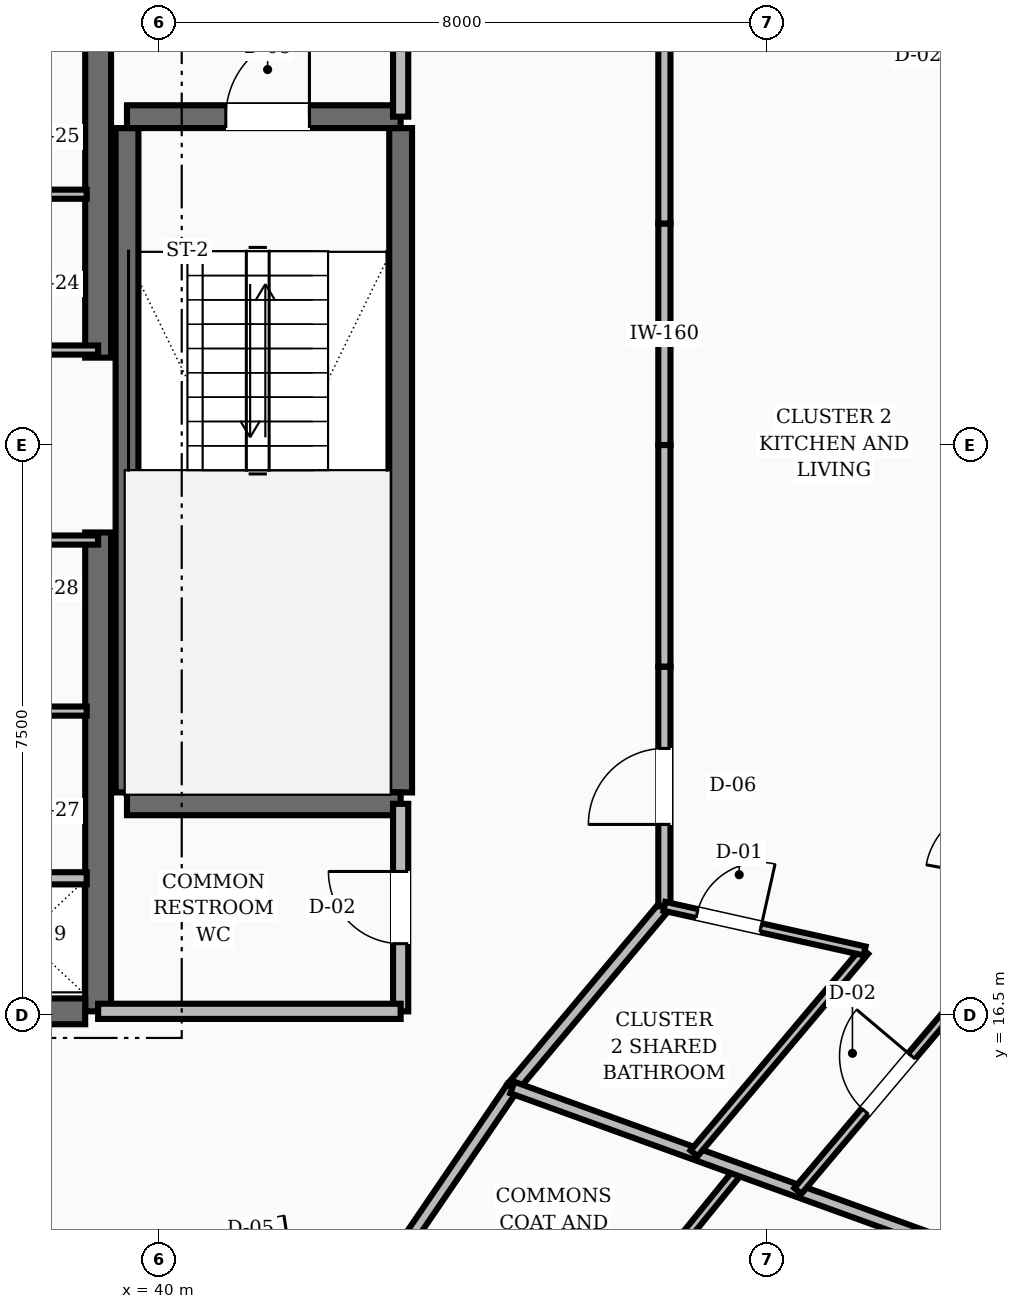
"""IFC4 building model, lengths in metres.
Left out: names, types, materials, properties, quantities, classifications, styles, units other than length and angle.
Written with IfcOpenShell. Run it as: python <this file> out.ifc"""

import sys

from ifc_helpers import new_model, si_unit, direction, frame, frame_2d, origin, place, context, subcontext, project, spatial, rectangle, extrude, element, fill, save


model = new_model("IFC4")
c1 = context("Model", 3, precision=1e-05, world=origin(), true_north=direction((0.0, 1.0)))
c2 = subcontext(c1, "Body", "Model", "MODEL_VIEW")
j1 = project(units=[si_unit("LENGTHUNIT", "METRE"), si_unit("PLANEANGLEUNIT", "RADIAN")], contexts=[c1])
p1 = place(None, origin())
s1 = spatial("IfcSite", under=j1, at=p1, CompositionType="ELEMENT")
p2 = place(p1, origin())
s2 = spatial("IfcBuilding", under=s1, at=p2, CompositionType="ELEMENT")
p3 = place(p2, frame((0.0, 0.0, 174.8)))
s3 = spatial("IfcBuildingStorey", under=s2, at=p3, CompositionType="ELEMENT", Elevation=174.8)
for number, where, z_axis, x_axis in (
    (1, (39.2, 16.55, 0.0), (0.0, 0.0, 1.0), (0.0, 1.0, 0.0)),
    (2, (39.2, 25.15, 0.0), (0.0, 0.0, 1.0), (0.0, 1.0, 0.0)),
):
    element("IfcWall", number, at=place(p3, frame(where, z_axis=z_axis, x_axis=x_axis)), inside=s3, PredefinedType="SHEAR", context=c2, shape_type="SweptSolid", body=[
        extrude(rectangle(XDim=6.3, YDim=0.34, at=frame_2d((3.15, 0.0))), origin(), (0.0, 0.0, 1.0), 3.6),
    ])
p4 = place(p3, frame((35.8, 16.55, 0.0), z_axis=(0.0, 0.0, 1.0), x_axis=(1.0, 0.0, 0.0)))
e3 = element("IfcWall", 3, at=p4, inside=s3, PredefinedType="SHEAR", context=c2, shape_type="SweptSolid", body=[
    extrude(rectangle(XDim=3.23, YDim=0.34, at=frame_2d((1.615, 0.0))), origin(), (0.0, 0.0, 1.0), 3.6),
])
p5 = place(p4, frame((0.3, 0.0, 0.0)))
e4 = element("IfcOpeningElement", 4, at=p5, cuts=e3, PredefinedType="OPENING", context=c2, shape_type="SweptSolid", body=[
    extrude(rectangle(XDim=1.1, YDim=2.1, at=frame_2d((0.55, 1.05))), frame((0.0, 0.18, 0.0), z_axis=(0.0, -1.0, 0.0), x_axis=(1.0, 0.0, 0.0)), (0.0, 0.0, 1.0), 0.36),
])
for number, where, z_axis, x_axis in (
    (5, (43.18, 19.43, 0.0), (0.0, 0.0, 1.0), (0.0, 1.0, 0.0)),
    (6, (39.58, 19.43, 0.0), (0.0, 0.0, 1.0), (0.0, 1.0, 0.0)),
):
    element("IfcWall", number, at=place(p3, frame(where, z_axis=z_axis, x_axis=x_axis)), inside=s3, PredefinedType="SHEAR", context=c2, shape_type="SweptSolid", body=[
        extrude(rectangle(XDim=8.74, YDim=0.3, at=frame_2d((4.37, 0.0))), origin(), (0.0, 0.0, 1.0), 3.6),
    ])
p6 = place(p3, frame((39.58, 19.28, 0.0), z_axis=(0.0, 0.0, 1.0), x_axis=(1.0, 0.0, 0.0)))
e7 = element("IfcWall", 7, at=p6, inside=s3, PredefinedType="SHEAR", context=c2, shape_type="SweptSolid", body=[
    extrude(rectangle(XDim=3.6, YDim=0.3, at=frame_2d((1.8, 0.0))), origin(), (0.0, 0.0, 1.0), 3.6),
])
p7 = place(p3, frame((39.58, 28.32, 0.0), z_axis=(0.0, 0.0, 1.0), x_axis=(1.0, 0.0, 0.0)))
e8 = element("IfcWall", 8, at=p7, inside=s3, PredefinedType="SHEAR", context=c2, shape_type="SweptSolid", body=[
    extrude(rectangle(XDim=3.6, YDim=0.3, at=frame_2d((1.8, 0.0))), origin(), (0.0, 0.0, 1.0), 3.6),
])
p8 = place(p7, frame((1.3, 0.0, 0.0)))
e9 = element("IfcOpeningElement", 9, at=p8, cuts=e8, PredefinedType="OPENING", context=c2, shape_type="SweptSolid", body=[
    extrude(rectangle(XDim=1.1, YDim=2.1, at=frame_2d((0.55, 1.05))), frame((0.0, 0.16, 0.0), z_axis=(0.0, -1.0, 0.0), x_axis=(1.0, 0.0, 0.0)), (0.0, 0.0, 1.0), 0.32),
])
p9 = place(p3, frame((43.18, 28.32, 0.0), z_axis=(0.0, 0.0, 1.0), x_axis=(0.0, 1.0, 0.0)))
e10 = element("IfcWall", 10, at=p9, inside=s3, PredefinedType="SOLIDWALL", context=c2, shape_type="SweptSolid", body=[
    extrude(rectangle(XDim=3.13, YDim=0.2, at=frame_2d((1.565, 0.0))), origin(), (0.0, 0.0, 1.0), 2.8),
])
p10 = place(p9, frame((1.015, 0.0, 0.0)))
e11 = element("IfcOpeningElement", 11, at=p10, cuts=e10, PredefinedType="OPENING", context=c2, shape_type="SweptSolid", body=[
    extrude(rectangle(XDim=1.1, YDim=2.1, at=frame_2d((0.55, 1.05))), frame((0.0, 0.11, 0.0), z_axis=(0.0, -1.0, 0.0), x_axis=(1.0, 0.0, 0.0)), (0.0, 0.0, 1.0), 0.22),
])
p11 = place(p3, frame((43.18, 16.55, 0.0), z_axis=(0.0, 0.0, 1.0), x_axis=(0.0, 1.0, 0.0)))
e12 = element("IfcWall", 12, at=p11, inside=s3, PredefinedType="SOLIDWALL", context=c2, shape_type="SweptSolid", body=[
    extrude(rectangle(XDim=2.73, YDim=0.2, at=frame_2d((1.365, 0.0))), origin(), (0.0, 0.0, 1.0), 2.8),
])
p12 = place(p11, frame((0.89, 0.0, 0.0)))
e13 = element("IfcOpeningElement", 13, at=p12, cuts=e12, PredefinedType="OPENING", context=c2, shape_type="SweptSolid", body=[
    extrude(rectangle(XDim=0.95, YDim=2.1, at=frame_2d((0.475, 1.05))), frame((0.0, 0.11, 0.0), z_axis=(0.0, -1.0, 0.0), x_axis=(1.0, 0.0, 0.0)), (0.0, 0.0, 1.0), 0.22),
])
p13 = place(p3, frame((39.2, 16.55, 0.0), z_axis=(0.0, 0.0, 1.0), x_axis=(1.0, 0.0, 0.0)))
e14 = element("IfcWall", 14, at=p13, inside=s3, PredefinedType="SOLIDWALL", context=c2, shape_type="SweptSolid", body=[
    extrude(rectangle(XDim=3.98, YDim=0.2, at=frame_2d((1.99, 0.0))), origin(), (0.0, 0.0, 1.0), 2.8),
])
p14 = place(p3, frame((37.4, 18.3, 0.0), z_axis=(0.0, 0.0, 1.0), x_axis=(1.0, 0.0, 0.0)))
e15 = element("IfcWall", 15, at=p14, inside=s3, PredefinedType="SOLIDWALL", context=c2, shape_type="SweptSolid", body=[
    extrude(rectangle(XDim=1.65, YDim=0.16, at=frame_2d((0.825, 0.0))), origin(), (0.0, 0.0, 1.0), 2.8),
])
for number, where, z_axis, x_axis in (
    (16, (37.4, 25.25, 0.0), (0.0, 0.0, 1.0), (1.0, 0.0, 0.0)),
    (17, (37.4, 22.75, 0.0), (0.0, 0.0, 1.0), (1.0, 0.0, 0.0)),
):
    element("IfcWall", number, at=place(p3, frame(where, z_axis=z_axis, x_axis=x_axis)), inside=s3, PredefinedType="PARTITIONING", context=c2, shape_type="SweptSolid", body=[
        extrude(rectangle(XDim=1.8, YDim=0.12, at=frame_2d((0.9, 0.0))), origin(), (0.0, 0.0, 1.0), 2.8),
    ])
for number, where, z_axis, x_axis in (
    (18, (37.4, 27.3, 0.0), (0.0, 0.0, 1.0), (1.0, 0.0, 0.0)),
    (19, (37.4, 20.5, 0.0), (0.0, 0.0, 1.0), (1.0, 0.0, 0.0)),
):
    element("IfcWall", number, at=place(p3, frame(where, z_axis=z_axis, x_axis=x_axis)), inside=s3, PredefinedType="PARTITIONING", context=c2, shape_type="SweptSolid", body=[
        extrude(rectangle(XDim=1.65, YDim=0.12, at=frame_2d((0.825, 0.0))), origin(), (0.0, 0.0, 1.0), 2.8),
    ])
p15 = place(p3, frame((46.65, 24.0, 0.0), z_axis=(0.0, 0.0, 1.0), x_axis=(0.0, 1.0, 0.0)))
e20 = element("IfcWall", 20, at=p15, inside=s3, PredefinedType="SOLIDWALL", context=c2, shape_type="SweptSolid", body=[
    extrude(rectangle(XDim=2.914, YDim=0.16, at=frame_2d((1.457, 0.0))), origin(), (0.0, 0.0, 1.0), 2.8),
])
p16 = place(p3, frame((46.65, 26.914, 0.0), z_axis=(0.0, 0.0, 1.0), x_axis=(0.0, 1.0, 0.0)))
e21 = element("IfcWall", 21, at=p16, inside=s3, PredefinedType="SOLIDWALL", context=c2, shape_type="SweptSolid", body=[
    extrude(rectangle(XDim=3.154, YDim=0.16, at=frame_2d((1.577, 0.0))), origin(), (0.0, 0.0, 1.0), 2.8),
])
p17 = place(p3, frame((42.95, 13.05, 0.0), z_axis=(0.0, 0.0, 1.0), x_axis=(0.562674669208, 0.826678423955, 0.0)))
e22 = element("IfcWall", 22, at=p17, inside=s3, PredefinedType="SOLIDWALL", context=c2, shape_type="SweptSolid", body=[
    extrude(rectangle(XDim=3.021, YDim=0.16, at=frame_2d((1.511, 0.0))), origin(), (0.0, 0.0, 1.0), 2.8),
])
p18 = place(p3, frame((44.65, 15.548, 0.0), z_axis=(0.0, 0.0, 1.0), x_axis=(0.642665742791, 0.76614668507, 0.0)))
e23 = element("IfcWall", 23, at=p18, inside=s3, PredefinedType="SOLIDWALL", context=c2, shape_type="SweptSolid", body=[
    extrude(rectangle(XDim=3.112, YDim=0.16, at=frame_2d((1.556, 0.0))), origin(), (0.0, 0.0, 1.0), 2.8),
])
p19 = place(p3, frame((46.65, 17.932, 0.0), z_axis=(0.0, 0.0, 1.0), x_axis=(0.0, 1.0, 0.0)))
e24 = element("IfcWall", 24, at=p19, inside=s3, PredefinedType="SOLIDWALL", context=c2, shape_type="SweptSolid", body=[
    extrude(rectangle(XDim=3.154, YDim=0.16, at=frame_2d((1.577, 0.0))), origin(), (0.0, 0.0, 1.0), 2.8),
])
p20 = place(p19, frame((1.077, 0.0, 0.0)))
e25 = element("IfcOpeningElement", 25, at=p20, cuts=e24, PredefinedType="OPENING", context=c2, shape_type="SweptSolid", body=[
    extrude(rectangle(XDim=1.0, YDim=2.1, at=frame_2d((0.5, 1.05))), frame((0.0, 0.09, 0.0), z_axis=(0.0, -1.0, 0.0), x_axis=(1.0, 0.0, 0.0)), (0.0, 0.0, 1.0), 0.18),
])
p21 = place(p3, frame((46.65, 21.086, 0.0), z_axis=(0.0, 0.0, 1.0), x_axis=(0.0, 1.0, 0.0)))
e26 = element("IfcWall", 26, at=p21, inside=s3, PredefinedType="SOLIDWALL", context=c2, shape_type="SweptSolid", body=[
    extrude(rectangle(XDim=2.914, YDim=0.16, at=frame_2d((1.457, 0.0))), origin(), (0.0, 0.0, 1.0), 2.8),
])
p22 = place(p3, frame((45.424, 11.74, 0.0), z_axis=(0.0, 0.0, 1.0), x_axis=(0.630511474319, 0.776179928079, 0.0)))
e27 = element("IfcWall", 27, at=p22, inside=s3, PredefinedType="PARTITIONING", context=c2, shape_type="SweptSolid", body=[
    extrude(rectangle(XDim=3.511, YDim=0.12, at=frame_2d((1.756, 0.0))), origin(), (0.0, 0.0, 1.0), 2.8),
])
p23 = place(p3, frame((44.65, 15.548, 0.0), z_axis=(0.0, 0.0, 1.0), x_axis=(0.940209575336, -0.340596468636, 0.0)))
e28 = element("IfcWall", 28, at=p23, inside=s3, PredefinedType="SOLIDWALL", context=c2, shape_type="SweptSolid", body=[
    extrude(rectangle(XDim=9.029, YDim=0.16, at=frame_2d((4.514, 0.0))), origin(), (0.0, 0.0, 1.0), 2.8),
])
p24 = place(p3, frame((47.04, 14.682, 0.0), z_axis=(0.0, 0.0, 1.0), x_axis=(0.644463857784, 0.764634772954, 0.0)))
e29 = element("IfcWall", 29, at=p24, inside=s3, PredefinedType="PARTITIONING", context=c2, shape_type="SweptSolid", body=[
    extrude(rectangle(XDim=3.482, YDim=0.12, at=frame_2d((1.741, 0.0))), origin(), (0.0, 0.0, 1.0), 2.8),
])
p25 = place(p3, frame((46.65, 17.932, 0.0), z_axis=(0.0, 0.0, 1.0), x_axis=(0.976010083103, -0.217725326231, 0.0)))
e30 = element("IfcWall", 30, at=p25, inside=s3, PredefinedType="PARTITIONING", context=c2, shape_type="SweptSolid", body=[
    extrude(rectangle(XDim=2.699, YDim=0.12, at=frame_2d((1.35, 0.0))), origin(), (0.0, 0.0, 1.0), 2.8),
])
p26 = place(p25, frame((0.44, 0.0, 0.0)))
e31 = element("IfcOpeningElement", 31, at=p26, cuts=e30, PredefinedType="OPENING", context=c2, shape_type="SweptSolid", body=[
    extrude(rectangle(XDim=0.86, YDim=2.1, at=frame_2d((0.43, 1.05))), frame((0.0, 0.07, 0.0), z_axis=(0.0, -1.0, 0.0), x_axis=(1.0, 0.0, 0.0)), (0.0, 0.0, 1.0), 0.14),
])
p27 = place(p3, frame((48.406, 14.187, 0.0), z_axis=(0.0, 0.0, 1.0), x_axis=(0.645325713634, 0.763907535846, 0.0)))
e32 = element("IfcWall", 32, at=p27, inside=s3, PredefinedType="PARTITIONING", context=c2, shape_type="SweptSolid", body=[
    extrude(rectangle(XDim=3.694, YDim=0.12, at=frame_2d((1.847, 0.0))), origin(), (0.0, 0.0, 1.0), 2.8),
])
p28 = place(p27, frame((1.372, 0.0, 0.0)))
e33 = element("IfcOpeningElement", 33, at=p28, cuts=e32, PredefinedType="OPENING", context=c2, shape_type="SweptSolid", body=[
    extrude(rectangle(XDim=0.95, YDim=2.1, at=frame_2d((0.475, 1.05))), frame((0.0, 0.07, 0.0), z_axis=(0.0, -1.0, 0.0), x_axis=(1.0, 0.0, 0.0)), (0.0, 0.0, 1.0), 0.14),
])
p29 = place(p8, origin())
e34 = element("IfcDoor", 34, at=p29, inside=s3, OperationType="SINGLE_SWING_RIGHT", PredefinedType="DOOR", context=c2, shape_type="SweptSolid", body=[
    extrude(rectangle(XDim=1.1, YDim=2.1, at=frame_2d((0.55, 1.05))), frame((0.0, 0.025, 0.0), z_axis=(0.0, -1.0, 0.0), x_axis=(1.0, 0.0, 0.0)), (0.0, 0.0, 1.0), 0.05),
])
fill(e9, e34)
p30 = place(p12, origin())
e35 = element("IfcDoor", 35, at=p30, inside=s3, OperationType="SINGLE_SWING_RIGHT", PredefinedType="DOOR", context=c2, shape_type="SweptSolid", body=[
    extrude(rectangle(XDim=0.95, YDim=2.1, at=frame_2d((0.475, 1.05))), frame((0.0, 0.025, 0.0), z_axis=(0.0, -1.0, 0.0), x_axis=(1.0, 0.0, 0.0)), (0.0, 0.0, 1.0), 0.05),
])
fill(e13, e35)
p31 = place(p26, origin())
e36 = element("IfcDoor", 36, at=p31, inside=s3, OperationType="SINGLE_SWING_RIGHT", PredefinedType="DOOR", context=c2, shape_type="SweptSolid", body=[
    extrude(rectangle(XDim=0.86, YDim=2.1, at=frame_2d((0.43, 1.05))), frame((0.0, 0.025, 0.0), z_axis=(0.0, -1.0, 0.0), x_axis=(1.0, 0.0, 0.0)), (0.0, 0.0, 1.0), 0.05),
])
fill(e31, e36)
p32 = place(p20, origin())
e37 = element("IfcDoor", 37, at=p32, inside=s3, OperationType="SINGLE_SWING_LEFT", PredefinedType="DOOR", context=c2, shape_type="SweptSolid", body=[
    extrude(rectangle(XDim=1.0, YDim=2.1, at=frame_2d((0.5, 1.05))), frame((0.0, 0.025, 0.0), z_axis=(0.0, -1.0, 0.0), x_axis=(1.0, 0.0, 0.0)), (0.0, 0.0, 1.0), 0.05),
])
fill(e25, e37)
p33 = place(p28, origin())
e38 = element("IfcDoor", 38, at=p33, inside=s3, OperationType="SINGLE_SWING_RIGHT", PredefinedType="DOOR", context=c2, shape_type="SweptSolid", body=[
    extrude(rectangle(XDim=0.95, YDim=2.1, at=frame_2d((0.475, 1.05))), frame((0.0, 0.025, 0.0), z_axis=(0.0, -1.0, 0.0), x_axis=(1.0, 0.0, 0.0)), (0.0, 0.0, 1.0), 0.05),
])
fill(e33, e38)
save(model, sys.argv[1])
